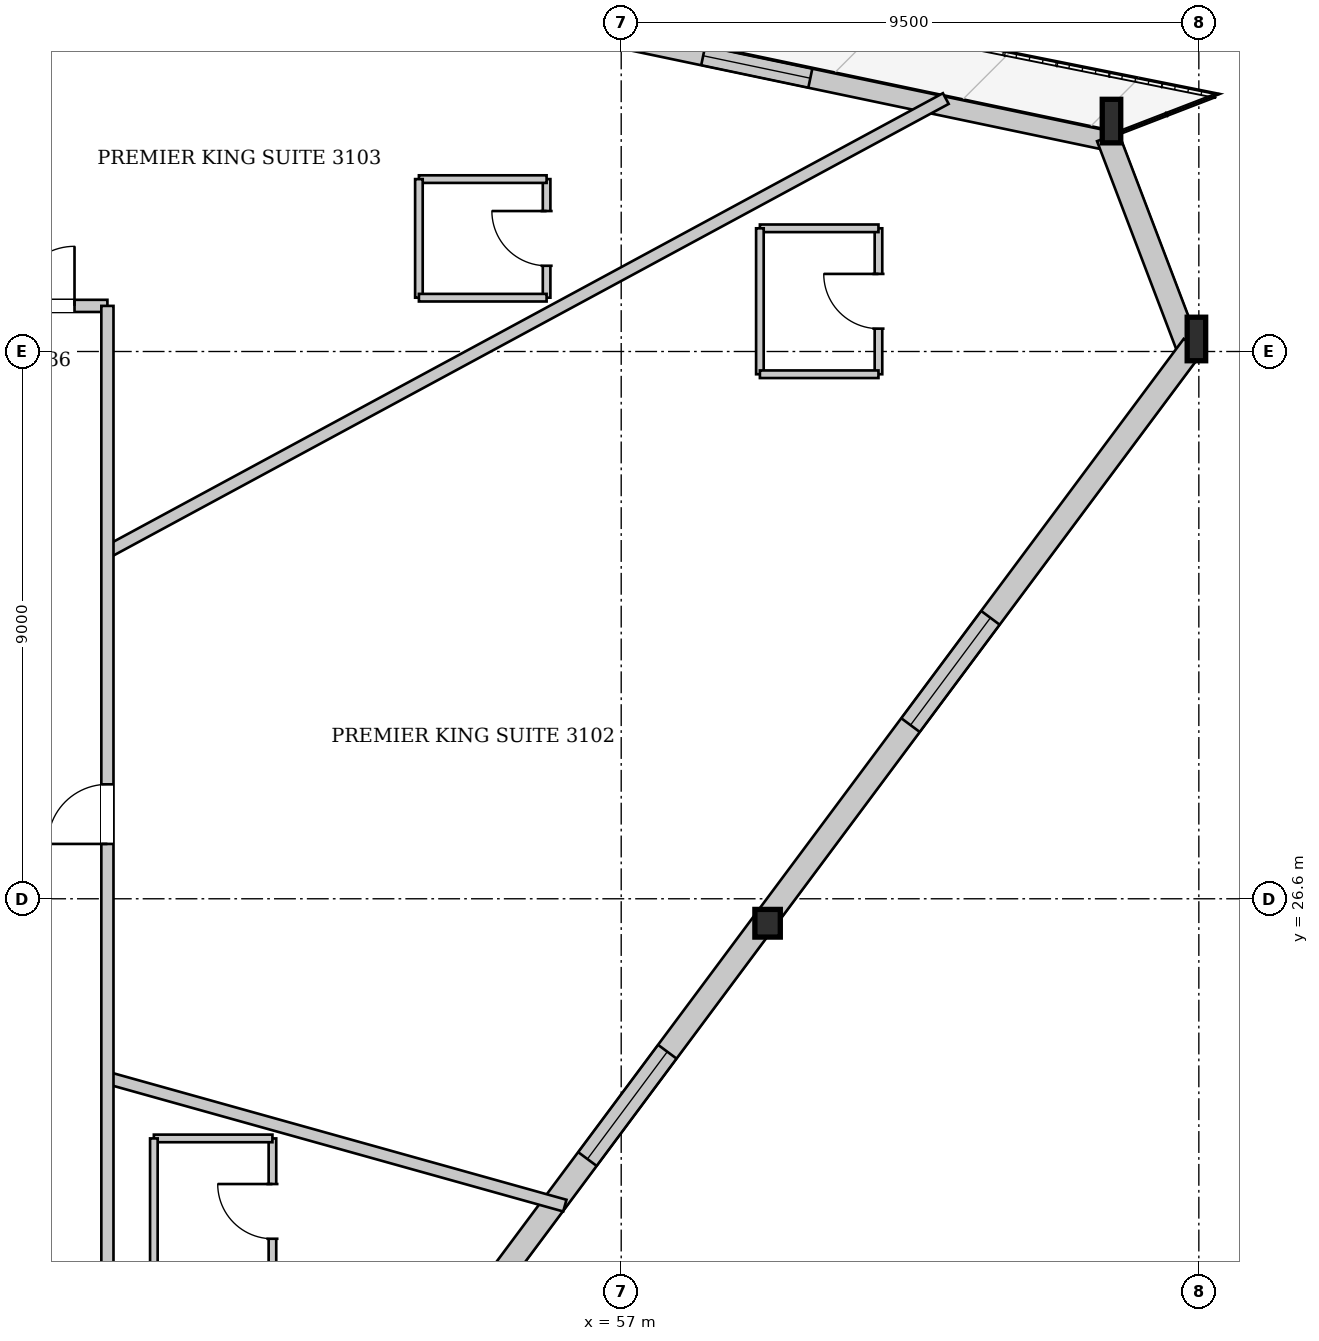
"""IFC4 building model, lengths in metres.
Left out: names, types, materials, properties, quantities, classifications, styles, units other than length and angle.
Written with IfcOpenShell. Run it as: python <this file> out.ifc"""

import sys

from ifc_helpers import new_model, si_unit, direction, frame, frame_2d, origin, origin_2d, place, context, subcontext, project, spatial, rectangle, i_section, extrude, source, transform, mapped, element, fill, save


model = new_model("IFC4")
c1 = context("Model", 3, precision=1e-05, world=origin(), true_north=direction((0.0, 1.0)))
c2 = subcontext(c1, "Body", "Model", "MODEL_VIEW")
j1 = project(units=[si_unit("LENGTHUNIT", "METRE"), si_unit("PLANEANGLEUNIT", "RADIAN")], contexts=[c1])
p1 = place(None, origin())
s1 = spatial("IfcSite", under=j1, at=p1, CompositionType="ELEMENT")
p2 = place(p1, origin())
s2 = spatial("IfcBuilding", under=s1, at=p2, CompositionType="ELEMENT")
p3 = place(p2, frame((0.0, 0.0, 119.9)))
s3 = spatial("IfcBuildingStorey", under=s2, at=p3, CompositionType="ELEMENT", Elevation=119.9)
m1 = source(origin(), c2, "Body", "SweptSolid", [
    extrude(i_section(OverallWidth=0.304, OverallDepth=0.716, WebThickness=0.021, FlangeThickness=0.04, at=origin_2d()), origin(), (0.0, 0.0, 1.0), 3.42),
])
p4 = place(p3, frame((66.557, 35.582, 0.0), z_axis=(-0.05632334247, 0.131135589503, 0.989763172814), x_axis=(-0.918834286781, -0.394643577719, 0.0)))
e1 = element("IfcColumn", 1, at=p4, inside=s3, PredefinedType="COLUMN", context=c2, shape_type="MappedRepresentation", body=[
    mapped(m1, transform((0.0, 0.0, 0.0), x_axis=(1.0, 0.0, 0.0), y_axis=(0.0, 1.0, 0.0), z_axis=(0.0, 0.0, 1.0), scale=1.0)),
])
m2 = source(origin(), c2, "Body", "SweptSolid", [
    extrude(i_section(OverallWidth=0.304, OverallDepth=0.716, WebThickness=0.021, FlangeThickness=0.04, at=origin_2d()), origin(), (0.0, 0.0, 1.0), 3.416),
])
p5 = place(p3, frame((65.181, 39.194, 0.0), z_axis=(-0.068833353091, 0.114436342989, 0.991043032822), x_axis=(-0.856925676529, -0.515439991566, 0.0)))
e2 = element("IfcColumn", 2, at=p5, inside=s3, PredefinedType="COLUMN", context=c2, shape_type="MappedRepresentation", body=[
    mapped(m2, transform((0.0, 0.0, 0.0), x_axis=(1.0, 0.0, 0.0), y_axis=(0.0, 1.0, 0.0), z_axis=(0.0, 0.0, 1.0), scale=1.0)),
])
m3 = source(origin(), c2, "Body", "SweptSolid", [
    extrude(i_section(OverallWidth=0.418, OverallDepth=0.455, WebThickness=0.038, FlangeThickness=0.059, at=origin_2d()), origin(), (0.0, 0.0, 1.0), 3.405),
])
p6 = place(p3, frame((59.433, 26.015, 0.0), z_axis=(-0.014914033004, 0.106979505973, 0.994149363487), x_axis=(-0.990421791636, -0.138074887842, 0.0)))
e3 = element("IfcColumn", 3, at=p6, inside=s3, PredefinedType="COLUMN", context=c2, shape_type="MappedRepresentation", body=[
    mapped(m3, transform((0.0, 0.0, 0.0), x_axis=(1.0, 0.0, 0.0), y_axis=(0.0, 1.0, 0.0), z_axis=(0.0, 0.0, 1.0), scale=1.0)),
])
p7 = place(p3, frame((42.384, 43.813, 0.0), z_axis=(0.0, 0.0, 1.0), x_axis=(0.978690657653, -0.205340197291, 0.0)))
e4 = element("IfcWall", 4, at=p7, inside=s3, PredefinedType="SOLIDWALL", context=c2, shape_type="SweptSolid", body=[
    extrude(rectangle(XDim=23.26, YDim=0.32, at=frame_2d((11.63, 0.0))), origin(), (0.0, 0.0, 1.0), 2.692),
])
p8 = place(p7, frame((6.893, 0.0, 0.0)))
e5 = element("IfcOpeningElement", 5, at=p8, cuts=e4, PredefinedType="OPENING", context=c2, shape_type="SweptSolid", body=[
    extrude(rectangle(XDim=1.1, YDim=2.3, at=frame_2d((0.55, 1.15))), frame((0.0, 0.17, 0.0), z_axis=(0.0, -1.0, 0.0), x_axis=(1.0, 0.0, 0.0)), (0.0, 0.0, 1.0), 0.34),
])
p9 = place(p7, frame((16.312, 0.0, 0.372)))
e6 = element("IfcOpeningElement", 6, at=p9, cuts=e4, PredefinedType="OPENING", context=c2, shape_type="SweptSolid", body=[
    extrude(rectangle(XDim=1.8, YDim=2.2, at=frame_2d((0.9, 1.1))), frame((0.0, 0.17, 0.0), z_axis=(0.0, -1.0, 0.0), x_axis=(1.0, 0.0, 0.0)), (0.0, 0.0, 1.0), 0.34),
])
p10 = place(p3, frame((65.003, 39.126, 0.0), z_axis=(0.0, 0.0, 1.0), x_axis=(0.355929661072, -0.934512748104, 0.0)))
e7 = element("IfcWall", 7, at=p10, inside=s3, PredefinedType="SOLIDWALL", context=c2, shape_type="SweptSolid", body=[
    extrude(rectangle(XDim=3.865, YDim=0.38, at=frame_2d((1.933, 0.0))), origin(), (0.0, 0.0, 1.0), 2.692),
])
p11 = place(p3, frame((66.404, 35.695, 0.0), z_axis=(0.0, 0.0, 1.0), x_axis=(-0.59725858194, -0.802048743094, 0.0)))
e8 = element("IfcWall", 8, at=p11, inside=s3, PredefinedType="SOLIDWALL", context=c2, shape_type="SweptSolid", body=[
    extrude(rectangle(XDim=23.855, YDim=0.38, at=frame_2d((11.927, 0.0))), origin(), (0.0, 0.0, 1.0), 2.692),
])
p12 = place(p11, frame((5.579, 0.0, 0.322)))
e9 = element("IfcOpeningElement", 9, at=p12, cuts=e8, PredefinedType="OPENING", context=c2, shape_type="SweptSolid", body=[
    extrude(rectangle(XDim=2.2, YDim=2.25, at=frame_2d((1.1, 1.125))), frame((0.0, 0.2, 0.0), z_axis=(0.0, -1.0, 0.0), x_axis=(1.0, 0.0, 0.0)), (0.0, 0.0, 1.0), 0.4),
])
p13 = place(p11, frame((14.476, 0.0, 0.322)))
e10 = element("IfcOpeningElement", 10, at=p13, cuts=e8, PredefinedType="OPENING", context=c2, shape_type="SweptSolid", body=[
    extrude(rectangle(XDim=2.2, YDim=2.25, at=frame_2d((1.1, 1.125))), frame((0.0, 0.2, 0.0), z_axis=(0.0, -1.0, 0.0), x_axis=(1.0, 0.0, 0.0)), (0.0, 0.0, 1.0), 0.4),
])
p14 = place(p3, frame((48.55, 23.654, 0.0), z_axis=(0.0, 0.0, 1.0), x_axis=(0.963168254659, -0.268899448153, 0.0)))
e11 = element("IfcWall", 11, at=p14, inside=s3, PredefinedType="PARTITIONING", context=c2, shape_type="SweptSolid", body=[
    extrude(rectangle(XDim=7.811, YDim=0.2, at=frame_2d((3.905, 0.0))), origin(), (0.0, 0.0, 1.0), 3.3),
])
p15 = place(p3, frame((48.55, 32.304, 0.0), z_axis=(0.0, 0.0, 1.0), x_axis=(0.879655089174, 0.475612157215, 0.0)))
e12 = element("IfcWall", 12, at=p15, inside=s3, PredefinedType="PARTITIONING", context=c2, shape_type="SweptSolid", body=[
    extrude(rectangle(XDim=15.675, YDim=0.2, at=frame_2d((7.837, 0.0))), origin(), (0.0, 0.0, 1.0), 3.3),
])
p16 = place(p3, frame((51.264, 20.259, 0.0), z_axis=(0.0, 0.0, 1.0), x_axis=(0.0, 1.0, 0.0)))
e13 = element("IfcWall", 13, at=p16, inside=s3, PredefinedType="PARTITIONING", context=c2, shape_type="SweptSolid", body=[
    extrude(rectangle(XDim=2.4, YDim=0.125, at=frame_2d((1.2, 0.0))), origin(), (0.0, 0.0, 1.0), 3.3),
])
p17 = place(p16, frame((0.75, 0.0, 0.0)))
e14 = element("IfcOpeningElement", 14, at=p17, cuts=e13, PredefinedType="OPENING", context=c2, shape_type="SweptSolid", body=[
    extrude(rectangle(XDim=0.9, YDim=2.1, at=frame_2d((0.45, 1.05))), frame((0.0, 0.073, 0.0), z_axis=(0.0, -1.0, 0.0), x_axis=(1.0, 0.0, 0.0)), (0.0, 0.0, 1.0), 0.145),
])
p18 = place(p3, frame((51.264, 22.659, 0.0), z_axis=(0.0, 0.0, 1.0), x_axis=(-1.0, 0.0, 0.0)))
e15 = element("IfcWall", 15, at=p18, inside=s3, PredefinedType="PARTITIONING", context=c2, shape_type="SweptSolid", body=[
    extrude(rectangle(XDim=1.95, YDim=0.125, at=frame_2d((0.975, 0.0))), origin(), (0.0, 0.0, 1.0), 3.3),
])
p19 = place(p3, frame((49.314, 22.659, 0.0), z_axis=(0.0, 0.0, 1.0), x_axis=(0.0, -1.0, 0.0)))
e16 = element("IfcWall", 16, at=p19, inside=s3, PredefinedType="PARTITIONING", context=c2, shape_type="SweptSolid", body=[
    extrude(rectangle(XDim=2.4, YDim=0.125, at=frame_2d((1.2, 0.0))), origin(), (0.0, 0.0, 1.0), 3.3),
])
p20 = place(p3, frame((61.231, 35.226, 0.0), z_axis=(0.0, 0.0, 1.0), x_axis=(0.0, 1.0, 0.0)))
e17 = element("IfcWall", 17, at=p20, inside=s3, PredefinedType="PARTITIONING", context=c2, shape_type="SweptSolid", body=[
    extrude(rectangle(XDim=2.4, YDim=0.125, at=frame_2d((1.2, 0.0))), origin(), (0.0, 0.0, 1.0), 3.3),
])
p21 = place(p20, frame((0.75, 0.0, 0.0)))
e18 = element("IfcOpeningElement", 18, at=p21, cuts=e17, PredefinedType="OPENING", context=c2, shape_type="SweptSolid", body=[
    extrude(rectangle(XDim=0.9, YDim=2.1, at=frame_2d((0.45, 1.05))), frame((0.0, 0.073, 0.0), z_axis=(0.0, -1.0, 0.0), x_axis=(1.0, 0.0, 0.0)), (0.0, 0.0, 1.0), 0.145),
])
p22 = place(p3, frame((61.231, 37.626, 0.0), z_axis=(0.0, 0.0, 1.0), x_axis=(-1.0, 0.0, 0.0)))
e19 = element("IfcWall", 19, at=p22, inside=s3, PredefinedType="PARTITIONING", context=c2, shape_type="SweptSolid", body=[
    extrude(rectangle(XDim=1.95, YDim=0.125, at=frame_2d((0.975, 0.0))), origin(), (0.0, 0.0, 1.0), 2.795),
])
p23 = place(p3, frame((59.281, 37.626, 0.0), z_axis=(0.0, 0.0, 1.0), x_axis=(0.0, -1.0, 0.0)))
e20 = element("IfcWall", 20, at=p23, inside=s3, PredefinedType="PARTITIONING", context=c2, shape_type="SweptSolid", body=[
    extrude(rectangle(XDim=2.4, YDim=0.125, at=frame_2d((1.2, 0.0))), origin(), (0.0, 0.0, 1.0), 3.3),
])
p24 = place(p3, frame((59.281, 35.226, 0.0), z_axis=(0.0, 0.0, 1.0), x_axis=(1.0, 0.0, 0.0)))
e21 = element("IfcWall", 21, at=p24, inside=s3, PredefinedType="PARTITIONING", context=c2, shape_type="SweptSolid", body=[
    extrude(rectangle(XDim=1.95, YDim=0.125, at=frame_2d((0.975, 0.0))), origin(), (0.0, 0.0, 1.0), 3.3),
])
p25 = place(p3, frame((55.773, 36.485, 0.0), z_axis=(0.0, 0.0, 1.0), x_axis=(0.0, 1.0, 0.0)))
e22 = element("IfcWall", 22, at=p25, inside=s3, PredefinedType="PARTITIONING", context=c2, shape_type="SweptSolid", body=[
    extrude(rectangle(XDim=1.95, YDim=0.125, at=frame_2d((0.975, 0.0))), origin(), (0.0, 0.0, 1.0), 3.3),
])
p26 = place(p25, frame((0.525, 0.0, 0.0)))
e23 = element("IfcOpeningElement", 23, at=p26, cuts=e22, PredefinedType="OPENING", context=c2, shape_type="SweptSolid", body=[
    extrude(rectangle(XDim=0.9, YDim=2.1, at=frame_2d((0.45, 1.05))), frame((0.0, 0.073, 0.0), z_axis=(0.0, -1.0, 0.0), x_axis=(1.0, 0.0, 0.0)), (0.0, 0.0, 1.0), 0.145),
])
p27 = place(p3, frame((55.773, 38.435, 0.0), z_axis=(0.0, 0.0, 1.0), x_axis=(-1.0, 0.0, 0.0)))
e24 = element("IfcWall", 24, at=p27, inside=s3, PredefinedType="PARTITIONING", context=c2, shape_type="SweptSolid", body=[
    extrude(rectangle(XDim=2.1, YDim=0.125, at=frame_2d((1.05, 0.0))), origin(), (0.0, 0.0, 1.0), 3.3),
])
p28 = place(p3, frame((53.673, 38.435, 0.0), z_axis=(0.0, 0.0, 1.0), x_axis=(0.0, -1.0, 0.0)))
e25 = element("IfcWall", 25, at=p28, inside=s3, PredefinedType="PARTITIONING", context=c2, shape_type="SweptSolid", body=[
    extrude(rectangle(XDim=1.95, YDim=0.125, at=frame_2d((0.975, 0.0))), origin(), (0.0, 0.0, 1.0), 3.3),
])
p29 = place(p3, frame((53.673, 36.485, 0.0), z_axis=(0.0, 0.0, 1.0), x_axis=(1.0, 0.0, 0.0)))
e26 = element("IfcWall", 26, at=p29, inside=s3, PredefinedType="PARTITIONING", context=c2, shape_type="SweptSolid", body=[
    extrude(rectangle(XDim=2.1, YDim=0.125, at=frame_2d((1.05, 0.0))), origin(), (0.0, 0.0, 1.0), 2.985),
])
p30 = place(p3, frame((27.45, 36.35, 0.0), z_axis=(0.0, 0.0, 1.0), x_axis=(1.0, 0.0, 0.0)))
e27 = element("IfcWall", 27, at=p30, inside=s3, PredefinedType="PARTITIONING", context=c2, shape_type="SweptSolid", body=[
    extrude(rectangle(XDim=21.1, YDim=0.2, at=frame_2d((10.55, 0.0))), origin(), (0.0, 0.0, 1.0), 3.3),
])
p31 = place(p30, frame((19.579, 0.0, 0.0)))
e28 = element("IfcOpeningElement", 28, at=p31, cuts=e27, PredefinedType="OPENING", context=c2, shape_type="SweptSolid", body=[
    extrude(rectangle(XDim=0.98, YDim=2.15, at=frame_2d((0.49, 1.075))), frame((0.0, 0.11, 0.0), z_axis=(0.0, -1.0, 0.0), x_axis=(1.0, 0.0, 0.0)), (0.0, 0.0, 1.0), 0.22),
])
p32 = place(p30, frame((10.375, 0.0, 0.0)))
e29 = element("IfcOpeningElement", 29, at=p32, cuts=e27, PredefinedType="OPENING", context=c2, shape_type="SweptSolid", body=[
    extrude(rectangle(XDim=0.98, YDim=2.15, at=frame_2d((0.49, 1.075))), frame((0.0, 0.11, 0.0), z_axis=(0.0, -1.0, 0.0), x_axis=(1.0, 0.0, 0.0)), (0.0, 0.0, 1.0), 0.22),
])
p33 = place(p3, frame((48.55, 16.85, 0.0), z_axis=(0.0, 0.0, 1.0), x_axis=(0.0, 1.0, 0.0)))
e30 = element("IfcWall", 30, at=p33, inside=s3, PredefinedType="PARTITIONING", context=c2, shape_type="SweptSolid", body=[
    extrude(rectangle(XDim=19.5, YDim=0.2, at=frame_2d((9.75, 0.0))), origin(), (0.0, 0.0, 1.0), 3.3),
])
p34 = place(p33, frame((10.652, 0.0, 0.0)))
e31 = element("IfcOpeningElement", 31, at=p34, cuts=e30, PredefinedType="OPENING", context=c2, shape_type="SweptSolid", body=[
    extrude(rectangle(XDim=0.98, YDim=2.15, at=frame_2d((0.49, 1.075))), frame((0.0, 0.11, 0.0), z_axis=(0.0, -1.0, 0.0), x_axis=(1.0, 0.0, 0.0)), (0.0, 0.0, 1.0), 0.22),
])
m4 = source(origin(), c2, "Body", "SweptSolid", [
    extrude(rectangle(XDim=1.8, YDim=2.2, at=frame_2d((0.9, 1.1))), frame((0.0, 0.03, 0.0), z_axis=(0.0, -1.0, 0.0), x_axis=(1.0, 0.0, 0.0)), (0.0, 0.0, 1.0), 0.06),
])
p35 = place(p9, origin())
e32 = element("IfcWindow", 32, at=p35, inside=s3, PartitioningType="SINGLE_PANEL", PredefinedType="WINDOW", context=c2, shape_type="MappedRepresentation", body=[
    mapped(m4, transform((0.0, 0.0, 0.0), x_axis=(1.0, 0.0, 0.0), y_axis=(0.0, 1.0, 0.0), z_axis=(0.0, 0.0, 1.0), scale=1.0)),
])
fill(e6, e32)
m5 = source(origin(), c2, "Body", "SweptSolid", [
    extrude(rectangle(XDim=2.2, YDim=2.25, at=frame_2d((1.1, 1.125))), frame((0.0, 0.03, 0.0), z_axis=(0.0, -1.0, 0.0), x_axis=(1.0, 0.0, 0.0)), (0.0, 0.0, 1.0), 0.06),
])
p36 = place(p12, origin())
e33 = element("IfcWindow", 33, at=p36, inside=s3, PartitioningType="SINGLE_PANEL", PredefinedType="WINDOW", context=c2, shape_type="MappedRepresentation", body=[
    mapped(m5, transform((0.0, 0.0, 0.0), x_axis=(1.0, 0.0, 0.0), y_axis=(0.0, 1.0, 0.0), z_axis=(0.0, 0.0, 1.0), scale=1.0)),
])
fill(e9, e33)
p37 = place(p13, origin())
e34 = element("IfcWindow", 34, at=p37, inside=s3, PartitioningType="SINGLE_PANEL", PredefinedType="WINDOW", context=c2, shape_type="MappedRepresentation", body=[
    mapped(m5, transform((0.0, 0.0, 0.0), x_axis=(1.0, 0.0, 0.0), y_axis=(0.0, 1.0, 0.0), z_axis=(0.0, 0.0, 1.0), scale=1.0)),
])
fill(e10, e34)
m6 = source(origin(), c2, "Body", "SweptSolid", [
    extrude(rectangle(XDim=0.9, YDim=2.1, at=frame_2d((0.45, 1.05))), frame((0.0, 0.025, 0.0), z_axis=(0.0, -1.0, 0.0), x_axis=(1.0, 0.0, 0.0)), (0.0, 0.0, 1.0), 0.05),
])
p38 = place(p17, origin())
e35 = element("IfcDoor", 35, at=p38, inside=s3, OperationType="SINGLE_SWING_RIGHT", PredefinedType="DOOR", context=c2, shape_type="MappedRepresentation", body=[
    mapped(m6, transform((0.0, 0.0, 0.0), x_axis=(1.0, 0.0, 0.0), y_axis=(0.0, 1.0, 0.0), z_axis=(0.0, 0.0, 1.0), scale=1.0)),
])
fill(e14, e35)
p39 = place(p21, origin())
e36 = element("IfcDoor", 36, at=p39, inside=s3, OperationType="SINGLE_SWING_RIGHT", PredefinedType="DOOR", context=c2, shape_type="MappedRepresentation", body=[
    mapped(m6, transform((0.0, 0.0, 0.0), x_axis=(1.0, 0.0, 0.0), y_axis=(0.0, 1.0, 0.0), z_axis=(0.0, 0.0, 1.0), scale=1.0)),
])
fill(e18, e36)
p40 = place(p26, origin())
e37 = element("IfcDoor", 37, at=p40, inside=s3, OperationType="SINGLE_SWING_RIGHT", PredefinedType="DOOR", context=c2, shape_type="MappedRepresentation", body=[
    mapped(m6, transform((0.0, 0.0, 0.0), x_axis=(1.0, 0.0, 0.0), y_axis=(0.0, 1.0, 0.0), z_axis=(0.0, 0.0, 1.0), scale=1.0)),
])
fill(e23, e37)
m7 = source(origin(), c2, "Body", "SweptSolid", [
    extrude(rectangle(XDim=0.98, YDim=2.15, at=frame_2d((0.49, 1.075))), frame((0.0, 0.025, 0.0), z_axis=(0.0, -1.0, 0.0), x_axis=(1.0, 0.0, 0.0)), (0.0, 0.0, 1.0), 0.05),
])
p41 = place(p31, origin())
e38 = element("IfcDoor", 38, at=p41, inside=s3, OperationType="SINGLE_SWING_RIGHT", PredefinedType="DOOR", context=c2, shape_type="MappedRepresentation", body=[
    mapped(m7, transform((0.0, 0.0, 0.0), x_axis=(1.0, 0.0, 0.0), y_axis=(0.0, 1.0, 0.0), z_axis=(0.0, 0.0, 1.0), scale=1.0)),
])
fill(e28, e38)
p42 = place(p34, origin())
e39 = element("IfcDoor", 39, at=p42, inside=s3, OperationType="SINGLE_SWING_LEFT", PredefinedType="DOOR", context=c2, shape_type="MappedRepresentation", body=[
    mapped(m7, transform((0.0, 0.0, 0.0), x_axis=(1.0, 0.0, 0.0), y_axis=(0.0, 1.0, 0.0), z_axis=(0.0, 0.0, 1.0), scale=1.0)),
])
fill(e31, e39)
save(model, sys.argv[1])
